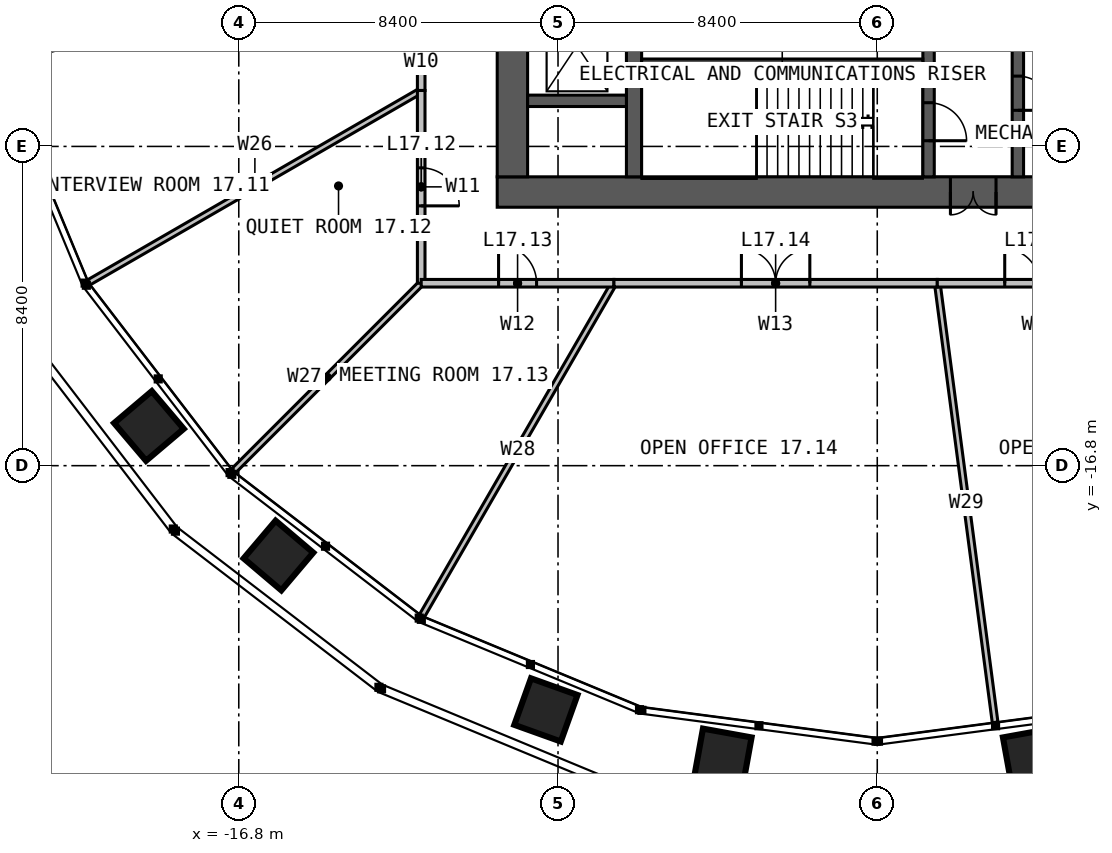
"""IFC4 building model, lengths in metres.
Left out: names, types, materials, properties, quantities, classifications, styles, units other than length and angle.
Written with IfcOpenShell. Run it as: python <this file> out.ifc"""

import sys

from ifc_helpers import new_model, si_unit, direction, frame, frame_2d, origin, place, context, subcontext, project, spatial, rectangle, extrude, element, fill, save


model = new_model("IFC4")
c1 = context("Model", 3, precision=1e-05, world=origin(), true_north=direction((0.0, 1.0)))
c2 = subcontext(c1, "Body", "Model", "MODEL_VIEW")
j1 = project(units=[si_unit("LENGTHUNIT", "METRE"), si_unit("PLANEANGLEUNIT", "RADIAN")], contexts=[c1])
p1 = place(None, origin())
s1 = spatial("IfcSite", under=j1, at=p1, CompositionType="ELEMENT")
p2 = place(p1, origin())
s2 = spatial("IfcBuilding", under=s1, at=p2, CompositionType="ELEMENT")
p3 = place(p2, frame((0.0, 0.0, 73.0)))
s3 = spatial("IfcBuildingStorey", under=s2, at=p3, CompositionType="ELEMENT", Elevation=73.0)
p4 = place(p3, frame((10.0, -9.6, 0.0), z_axis=(0.0, 0.0, 1.0), x_axis=(-1.0, 0.0, 0.0)))
e1 = element("IfcWall", 1, at=p4, inside=s3, PredefinedType="SOLIDWALL", context=c2, shape_type="SweptSolid", body=[
    extrude(rectangle(XDim=20.0, YDim=0.8, at=frame_2d((10.0, 0.0))), origin(), (0.0, 0.0, 1.0), 4.0),
])
p5 = place(p4, frame((6.875, 0.0, 0.0)))
e2 = element("IfcOpeningElement", 2, at=p5, cuts=e1, PredefinedType="OPENING", context=c2, shape_type="SweptSolid", body=[
    extrude(rectangle(XDim=1.2, YDim=2.2, at=frame_2d((0.6, 1.1))), frame((0.0, 0.41, 0.0), z_axis=(0.0, -1.0, 0.0), x_axis=(1.0, 0.0, 0.0)), (0.0, 0.0, 1.0), 0.82),
])
p6 = place(p3, frame((-9.6, 9.2, 0.0), z_axis=(0.0, 0.0, 1.0), x_axis=(0.0, -1.0, 0.0)))
e3 = element("IfcWall", 3, at=p6, inside=s3, PredefinedType="SOLIDWALL", context=c2, shape_type="SweptSolid", body=[
    extrude(rectangle(XDim=18.4, YDim=0.8, at=frame_2d((9.2, 0.0))), origin(), (0.0, 0.0, 1.0), 4.0),
])
p7 = place(p3, frame((-6.4, -9.2, 0.0), z_axis=(0.0, 0.0, 1.0), x_axis=(0.0, 1.0, 0.0)))
e4 = element("IfcWall", 4, at=p7, inside=s3, PredefinedType="SOLIDWALL", context=c2, shape_type="SweptSolid", body=[
    extrude(rectangle(XDim=18.4, YDim=0.4, at=frame_2d((9.2, 0.0))), origin(), (0.0, 0.0, 1.0), 4.0),
])
p8 = place(p7, frame((8.7, 0.0, 0.0)))
e5 = element("IfcOpeningElement", 5, at=p8, cuts=e4, PredefinedType="OPENING", context=c2, shape_type="SweptSolid", body=[
    extrude(rectangle(XDim=1.0, YDim=2.2, at=frame_2d((0.5, 1.1))), frame((0.0, 0.21, 0.0), z_axis=(0.0, -1.0, 0.0), x_axis=(1.0, 0.0, 0.0)), (0.0, 0.0, 1.0), 0.42),
])
p9 = place(p3, frame((1.35, -1.45, 0.0), z_axis=(0.0, 0.0, 1.0), x_axis=(0.0, -1.0, 0.0)))
e6 = element("IfcWall", 6, at=p9, inside=s3, PredefinedType="SOLIDWALL", context=c2, shape_type="SweptSolid", body=[
    extrude(rectangle(XDim=7.75, YDim=0.3, at=frame_2d((3.875, 0.0))), origin(), (0.0, 0.0, 1.0), 4.0),
])
p10 = place(p9, frame((5.8, 0.0, 0.0)))
e7 = element("IfcOpeningElement", 7, at=p10, cuts=e6, PredefinedType="OPENING", context=c2, shape_type="SweptSolid", body=[
    extrude(rectangle(XDim=1.0, YDim=2.2, at=frame_2d((0.5, 1.1))), frame((0.0, 0.16, 0.0), z_axis=(0.0, -1.0, 0.0), x_axis=(1.0, 0.0, 0.0)), (0.0, 0.0, 1.0), 0.32),
])
p11 = place(p9, frame((3.525, 0.0, 0.0)))
e8 = element("IfcOpeningElement", 8, at=p11, cuts=e6, PredefinedType="OPENING", context=c2, shape_type="SweptSolid", body=[
    extrude(rectangle(XDim=0.9, YDim=2.2, at=frame_2d((0.45, 1.1))), frame((0.0, 0.16, 0.0), z_axis=(0.0, -1.0, 0.0), x_axis=(1.0, 0.0, 0.0)), (0.0, 0.0, 1.0), 0.32),
])
p12 = place(p3, frame((3.7, -1.45, 0.0), z_axis=(0.0, 0.0, 1.0), x_axis=(0.0, -1.0, 0.0)))
e9 = element("IfcWall", 9, at=p12, inside=s3, PredefinedType="SOLIDWALL", context=c2, shape_type="SweptSolid", body=[
    extrude(rectangle(XDim=7.75, YDim=0.3, at=frame_2d((3.875, 0.0))), origin(), (0.0, 0.0, 1.0), 4.0),
])
p13 = place(p12, frame((5.1, 0.0, 0.0)))
e10 = element("IfcOpeningElement", 10, at=p13, cuts=e9, PredefinedType="OPENING", context=c2, shape_type="SweptSolid", body=[
    extrude(rectangle(XDim=0.9, YDim=2.2, at=frame_2d((0.45, 1.1))), frame((0.0, 0.16, 0.0), z_axis=(0.0, -1.0, 0.0), x_axis=(1.0, 0.0, 0.0)), (0.0, 0.0, 1.0), 0.32),
])
p14 = place(p3, frame((-6.2, -6.2, 0.0), z_axis=(0.0, 0.0, 1.0), x_axis=(1.0, 0.0, 0.0)))
e11 = element("IfcWall", 11, at=p14, inside=s3, PredefinedType="SOLIDWALL", context=c2, shape_type="SweptSolid", body=[
    extrude(rectangle(XDim=7.4, YDim=0.2, at=frame_2d((3.7, 0.0))), origin(), (0.0, 0.0, 1.0), 4.0),
])
p15 = place(p3, frame((-9.2, -7.2, 0.0), z_axis=(0.0, 0.0, 1.0), x_axis=(1.0, 0.0, 0.0)))
e12 = element("IfcWall", 12, at=p15, inside=s3, PredefinedType="SOLIDWALL", context=c2, shape_type="SweptSolid", body=[
    extrude(rectangle(XDim=2.6, YDim=0.3, at=frame_2d((1.3, 0.0))), origin(), (0.0, 0.0, 1.0), 4.0),
])
p16 = place(p3, frame((-12.0, -3.215, 0.0), z_axis=(0.0, 0.0, 1.0), x_axis=(-0.96592415734, -0.258825273624, 0.0)))
e13 = element("IfcWall", 13, at=p16, inside=s3, PredefinedType="PARTITIONING", context=c2, shape_type="SweptSolid", body=[
    extrude(rectangle(XDim=11.539, YDim=0.15, at=frame_2d((5.77, 0.0))), origin(), (0.0, 0.0, 1.0), 2.79),
])
p17 = place(p3, frame((-12.0, -6.928, 0.0), z_axis=(0.0, 0.0, 1.0), x_axis=(-0.866023860286, -0.500002673408, 0.0)))
e14 = element("IfcWall", 14, at=p17, inside=s3, PredefinedType="PARTITIONING", context=c2, shape_type="SweptSolid", body=[
    extrude(rectangle(XDim=10.106, YDim=0.15, at=frame_2d((5.053, 0.0))), origin(), (0.0, 0.0, 1.0), 2.79),
])
p18 = place(p3, frame((-12.0, -12.0, 0.0), z_axis=(0.0, 0.0, 1.0), x_axis=(-0.707106781187, -0.707106781187, 0.0)))
e15 = element("IfcWall", 15, at=p18, inside=s3, PredefinedType="PARTITIONING", context=c2, shape_type="SweptSolid", body=[
    extrude(rectangle(XDim=6.992, YDim=0.15, at=frame_2d((3.496, 0.0))), origin(), (0.0, 0.0, 1.0), 2.79),
])
p19 = place(p3, frame((-6.928, -12.0, 0.0), z_axis=(0.0, 0.0, 1.0), x_axis=(-0.500002673408, -0.866023860286, 0.0)))
e16 = element("IfcWall", 16, at=p19, inside=s3, PredefinedType="PARTITIONING", context=c2, shape_type="SweptSolid", body=[
    extrude(rectangle(XDim=10.106, YDim=0.15, at=frame_2d((5.053, 0.0))), origin(), (0.0, 0.0, 1.0), 2.79),
])
p20 = place(p3, frame((1.58, -12.0, 0.0), z_axis=(0.0, 0.0, 1.0), x_axis=(0.130516833846, -0.991446093382, 0.0)))
e17 = element("IfcWall", 17, at=p20, inside=s3, PredefinedType="PARTITIONING", context=c2, shape_type="SweptSolid", body=[
    extrude(rectangle(XDim=11.654, YDim=0.15, at=frame_2d((5.827, 0.0))), origin(), (0.0, 0.0, 1.0), 2.79),
])
p21 = place(p3, frame((-12.0, -3.215, 0.0), z_axis=(0.0, 0.0, 1.0), x_axis=(0.0, -1.0, 0.0)))
e18 = element("IfcWall", 18, at=p21, inside=s3, PredefinedType="PARTITIONING", context=c2, shape_type="SweptSolid", body=[
    extrude(rectangle(XDim=3.713, YDim=0.2, at=frame_2d((1.856, 0.0))), origin(), (0.0, 0.0, 1.0), 3.8),
])
p22 = place(p21, frame((1.356, 0.0, 0.0)))
e19 = element("IfcOpeningElement", 19, at=p22, cuts=e18, PredefinedType="OPENING", context=c2, shape_type="SweptSolid", body=[
    extrude(rectangle(XDim=1.0, YDim=2.2, at=frame_2d((0.5, 1.1))), frame((0.0, 0.11, 0.0), z_axis=(0.0, -1.0, 0.0), x_axis=(1.0, 0.0, 0.0)), (0.0, 0.0, 1.0), 0.22),
])
p23 = place(p3, frame((-12.0, -6.928, 0.0), z_axis=(0.0, 0.0, 1.0), x_axis=(0.0, -1.0, 0.0)))
e20 = element("IfcWall", 20, at=p23, inside=s3, PredefinedType="PARTITIONING", context=c2, shape_type="SweptSolid", body=[
    extrude(rectangle(XDim=5.072, YDim=0.2, at=frame_2d((2.536, 0.0))), origin(), (0.0, 0.0, 1.0), 3.8),
])
p24 = place(p23, frame((2.036, 0.0, 0.0)))
e21 = element("IfcOpeningElement", 21, at=p24, cuts=e20, PredefinedType="OPENING", context=c2, shape_type="SweptSolid", body=[
    extrude(rectangle(XDim=1.0, YDim=2.2, at=frame_2d((0.5, 1.1))), frame((0.0, 0.11, 0.0), z_axis=(0.0, -1.0, 0.0), x_axis=(1.0, 0.0, 0.0)), (0.0, 0.0, 1.0), 0.22),
])
p25 = place(p3, frame((-12.0, -12.0, 0.0), z_axis=(0.0, 0.0, 1.0), x_axis=(1.0, 0.0, 0.0)))
e22 = element("IfcWall", 22, at=p25, inside=s3, PredefinedType="PARTITIONING", context=c2, shape_type="SweptSolid", body=[
    extrude(rectangle(XDim=5.072, YDim=0.2, at=frame_2d((2.536, 0.0))), origin(), (0.0, 0.0, 1.0), 3.8),
])
p26 = place(p25, frame((2.036, 0.0, 0.0)))
e23 = element("IfcOpeningElement", 23, at=p26, cuts=e22, PredefinedType="OPENING", context=c2, shape_type="SweptSolid", body=[
    extrude(rectangle(XDim=1.0, YDim=2.2, at=frame_2d((0.5, 1.1))), frame((0.0, 0.11, 0.0), z_axis=(0.0, -1.0, 0.0), x_axis=(1.0, 0.0, 0.0)), (0.0, 0.0, 1.0), 0.22),
])
p27 = place(p3, frame((-6.928, -12.0, 0.0), z_axis=(0.0, 0.0, 1.0), x_axis=(1.0, 0.0, 0.0)))
e24 = element("IfcWall", 24, at=p27, inside=s3, PredefinedType="PARTITIONING", context=c2, shape_type="SweptSolid", body=[
    extrude(rectangle(XDim=8.508, YDim=0.2, at=frame_2d((4.254, 0.0))), origin(), (0.0, 0.0, 1.0), 3.8),
])
p28 = place(p27, frame((3.354, 0.0, 0.0)))
e25 = element("IfcOpeningElement", 25, at=p28, cuts=e24, PredefinedType="OPENING", context=c2, shape_type="SweptSolid", body=[
    extrude(rectangle(XDim=1.8, YDim=2.2, at=frame_2d((0.9, 1.1))), frame((0.0, 0.11, 0.0), z_axis=(0.0, -1.0, 0.0), x_axis=(1.0, 0.0, 0.0)), (0.0, 0.0, 1.0), 0.22),
])
p29 = place(p3, frame((1.58, -12.0, 0.0), z_axis=(0.0, 0.0, 1.0), x_axis=(1.0, 0.0, 0.0)))
e26 = element("IfcWall", 26, at=p29, inside=s3, PredefinedType="PARTITIONING", context=c2, shape_type="SweptSolid", body=[
    extrude(rectangle(XDim=5.348, YDim=0.2, at=frame_2d((2.674, 0.0))), origin(), (0.0, 0.0, 1.0), 3.8),
])
p30 = place(p29, frame((1.774, 0.0, 0.0)))
e27 = element("IfcOpeningElement", 27, at=p30, cuts=e26, PredefinedType="OPENING", context=c2, shape_type="SweptSolid", body=[
    extrude(rectangle(XDim=1.8, YDim=2.2, at=frame_2d((0.9, 1.1))), frame((0.0, 0.11, 0.0), z_axis=(0.0, -1.0, 0.0), x_axis=(1.0, 0.0, 0.0)), (0.0, 0.0, 1.0), 0.22),
])
p31 = place(p5, origin())
e28 = element("IfcDoor", 28, at=p31, inside=s3, OperationType="DOUBLE_DOOR_SINGLE_SWING", PredefinedType="DOOR", context=c2, shape_type="SweptSolid", body=[
    extrude(rectangle(XDim=1.2, YDim=2.2, at=frame_2d((0.6, 1.1))), frame((0.0, 0.025, 0.0), z_axis=(0.0, -1.0, 0.0), x_axis=(1.0, 0.0, 0.0)), (0.0, 0.0, 1.0), 0.05),
])
fill(e2, e28)
p32 = place(p10, origin())
e29 = element("IfcDoor", 29, at=p32, inside=s3, OperationType="SINGLE_SWING_RIGHT", PredefinedType="DOOR", context=c2, shape_type="SweptSolid", body=[
    extrude(rectangle(XDim=1.0, YDim=2.2, at=frame_2d((0.5, 1.1))), frame((0.0, 0.025, 0.0), z_axis=(0.0, -1.0, 0.0), x_axis=(1.0, 0.0, 0.0)), (0.0, 0.0, 1.0), 0.05),
])
fill(e7, e29)
p33 = place(p13, origin())
e30 = element("IfcDoor", 30, at=p33, inside=s3, OperationType="SINGLE_SWING_RIGHT", PredefinedType="DOOR", context=c2, shape_type="SweptSolid", body=[
    extrude(rectangle(XDim=0.9, YDim=2.2, at=frame_2d((0.45, 1.1))), frame((0.0, 0.025, 0.0), z_axis=(0.0, -1.0, 0.0), x_axis=(1.0, 0.0, 0.0)), (0.0, 0.0, 1.0), 0.05),
])
fill(e10, e30)
p34 = place(p24, origin())
e31 = element("IfcDoor", 31, at=p34, inside=s3, OperationType="SINGLE_SWING_RIGHT", PredefinedType="DOOR", context=c2, shape_type="SweptSolid", body=[
    extrude(rectangle(XDim=1.0, YDim=2.2, at=frame_2d((0.5, 1.1))), frame((0.0, 0.025, 0.0), z_axis=(0.0, -1.0, 0.0), x_axis=(1.0, 0.0, 0.0)), (0.0, 0.0, 1.0), 0.05),
])
fill(e21, e31)
p35 = place(p26, origin())
e32 = element("IfcDoor", 32, at=p35, inside=s3, OperationType="SINGLE_SWING_LEFT", PredefinedType="DOOR", context=c2, shape_type="SweptSolid", body=[
    extrude(rectangle(XDim=1.0, YDim=2.2, at=frame_2d((0.5, 1.1))), frame((0.0, 0.025, 0.0), z_axis=(0.0, -1.0, 0.0), x_axis=(1.0, 0.0, 0.0)), (0.0, 0.0, 1.0), 0.05),
])
fill(e23, e32)
p36 = place(p28, origin())
e33 = element("IfcDoor", 33, at=p36, inside=s3, OperationType="DOUBLE_DOOR_SINGLE_SWING", PredefinedType="DOOR", context=c2, shape_type="SweptSolid", body=[
    extrude(rectangle(XDim=1.8, YDim=2.2, at=frame_2d((0.9, 1.1))), frame((0.0, 0.025, 0.0), z_axis=(0.0, -1.0, 0.0), x_axis=(1.0, 0.0, 0.0)), (0.0, 0.0, 1.0), 0.05),
])
fill(e25, e33)
p37 = place(p30, origin())
e34 = element("IfcDoor", 34, at=p37, inside=s3, OperationType="DOUBLE_DOOR_SINGLE_SWING", PredefinedType="DOOR", context=c2, shape_type="SweptSolid", body=[
    extrude(rectangle(XDim=1.8, YDim=2.2, at=frame_2d((0.9, 1.1))), frame((0.0, 0.025, 0.0), z_axis=(0.0, -1.0, 0.0), x_axis=(1.0, 0.0, 0.0)), (0.0, 0.0, 1.0), 0.05),
])
fill(e27, e34)
save(model, sys.argv[1])
